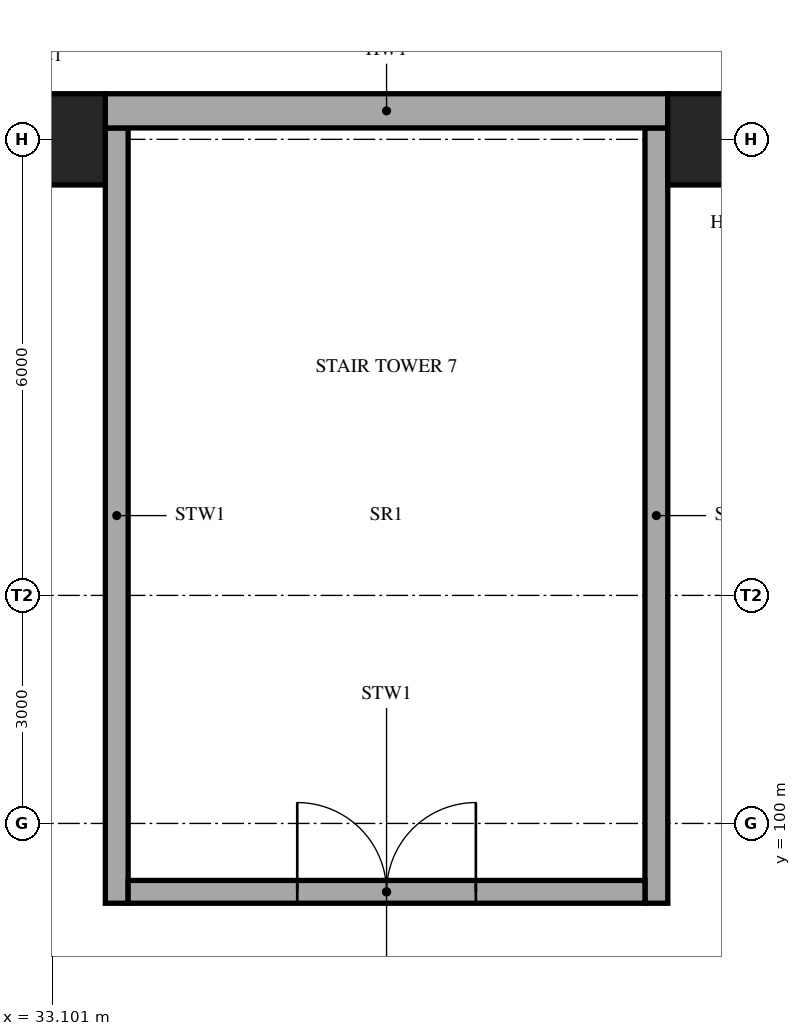
"""IFC4 building model, lengths in metres.
Left out: names, types, materials, properties, quantities, classifications, styles, units other than length and angle.
Written with IfcOpenShell. Run it as: python <this file> out.ifc"""

import sys

from ifc_helpers import new_model, si_unit, direction, frame, frame_2d, origin, origin_2d, place, context, subcontext, project, spatial, rectangle, extrude, element, fill, save


model = new_model("IFC4")
c1 = context("Model", 3, precision=1e-05, world=origin(), true_north=direction((0.0, 1.0)))
c2 = subcontext(c1, "Body", "Model", "MODEL_VIEW")
j1 = project(units=[si_unit("LENGTHUNIT", "METRE"), si_unit("PLANEANGLEUNIT", "RADIAN")], contexts=[c1])
p1 = place(None, origin())
s1 = spatial("IfcSite", under=j1, at=p1, CompositionType="ELEMENT")
p2 = place(p1, origin())
s2 = spatial("IfcBuilding", under=s1, at=p2, CompositionType="ELEMENT")
p3 = place(p2, frame((0.0, 0.0, 15.0)))
s3 = spatial("IfcBuildingStorey", under=s2, at=p3, CompositionType="ELEMENT", Elevation=15.0)
for number, where, z_axis, x_axis in (
    (1, (33.0, 109.0, 0.0), (0.0, 0.0, 1.0), (1.0, 0.0, 0.0)),
    (2, (42.0, 109.0, 0.0), (0.0, 0.0, 1.0), (1.0, 0.0, 0.0)),
):
    element("IfcColumn", number, at=place(p3, frame(where, z_axis=z_axis, x_axis=x_axis)), inside=s3, PredefinedType="COLUMN", context=c2, shape_type="SweptSolid", body=[
        extrude(rectangle(XDim=1.6, YDim=1.2, at=origin_2d()), origin(), (0.0, 0.0, 1.0), 4.2),
    ])
for number, where, z_axis, x_axis in (
    (3, (33.95, 109.15, 0.0), (0.0, 0.0, 1.0), (0.0, -1.0, 0.0)),
    (4, (41.05, 109.15, 0.0), (0.0, 0.0, 1.0), (0.0, -1.0, 0.0)),
):
    element("IfcWall", number, at=place(p3, frame(where, z_axis=z_axis, x_axis=x_axis)), inside=s3, PredefinedType="SHEAR", context=c2, shape_type="SweptSolid", body=[
        extrude(rectangle(XDim=10.2, YDim=0.3, at=frame_2d((5.1, 0.0))), origin(), (0.0, 0.0, 1.0), 3.9),
    ])
p4 = place(p3, frame((34.1, 99.1, 0.0), z_axis=(0.0, 0.0, 1.0), x_axis=(1.0, 0.0, 0.0)))
e5 = element("IfcWall", 5, at=p4, inside=s3, PredefinedType="SHEAR", context=c2, shape_type="SweptSolid", body=[
    extrude(rectangle(XDim=6.8, YDim=0.3, at=frame_2d((3.4, 0.0))), origin(), (0.0, 0.0, 1.0), 3.9),
])
p5 = place(p4, frame((2.225, 0.0, 0.0)))
e6 = element("IfcOpeningElement", 6, at=p5, cuts=e5, PredefinedType="OPENING", context=c2, shape_type="SweptSolid", body=[
    extrude(rectangle(XDim=2.35, YDim=2.1, at=frame_2d((1.175, 1.05))), frame((0.0, 0.16, 0.0), z_axis=(0.0, -1.0, 0.0), x_axis=(1.0, 0.0, 0.0)), (0.0, 0.0, 1.0), 0.32),
])
p6 = place(p3, frame((33.8, 109.375, 0.0), z_axis=(0.0, 0.0, 1.0), x_axis=(1.0, 0.0, 0.0)))
e7 = element("IfcWall", 7, at=p6, inside=s3, PredefinedType="SOLIDWALL", context=c2, shape_type="SweptSolid", body=[
    extrude(rectangle(XDim=7.4, YDim=0.45, at=frame_2d((3.7, 0.0))), origin(), (0.0, 0.0, 1.0), 4.2),
])
p7 = place(p5, origin())
e8 = element("IfcDoor", 8, at=p7, inside=s3, OperationType="DOUBLE_DOOR_SINGLE_SWING", PredefinedType="DOOR", context=c2, shape_type="SweptSolid", body=[
    extrude(rectangle(XDim=2.35, YDim=2.1, at=frame_2d((1.175, 1.05))), frame((0.0, 0.025, 0.0), z_axis=(0.0, -1.0, 0.0), x_axis=(1.0, 0.0, 0.0)), (0.0, 0.0, 1.0), 0.05),
])
fill(e6, e8)
save(model, sys.argv[1])
